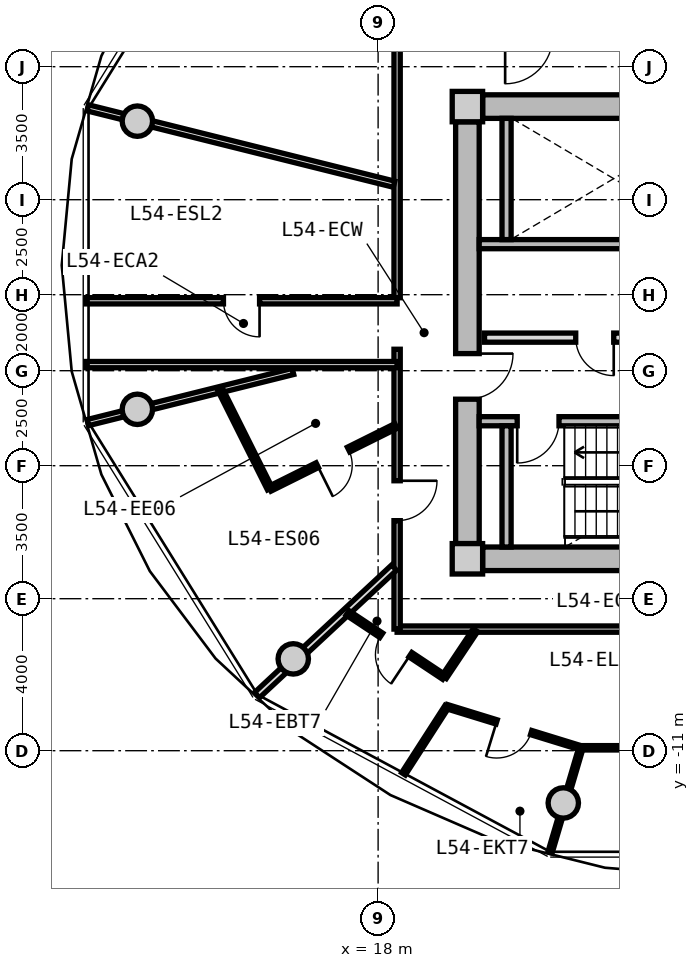
"""IFC4 building model, lengths in metres.
Left out: names, types, materials, properties, quantities, classifications, styles, units other than length and angle.
Written with IfcOpenShell. Run it as: python <this file> out.ifc"""

import sys

from ifc_helpers import new_model, si_unit, direction, frame, frame_2d, origin, origin_2d, place, context, subcontext, project, spatial, rectangle, circle, extrude, source, transform, mapped, element, fill, save


model = new_model("IFC4")
c1 = context("Model", 3, precision=1e-05, world=origin(), true_north=direction((0.0, 1.0)))
c2 = subcontext(c1, "Body", "Model", "MODEL_VIEW")
j1 = project(units=[si_unit("LENGTHUNIT", "METRE"), si_unit("PLANEANGLEUNIT", "RADIAN")], contexts=[c1])
p1 = place(None, origin())
s1 = spatial("IfcSite", under=j1, at=p1, CompositionType="ELEMENT")
p2 = place(p1, origin())
s2 = spatial("IfcBuilding", under=s1, at=p2, CompositionType="ELEMENT")
p3 = place(p2, frame((0.0, 0.0, 173.95)))
s3 = spatial("IfcBuildingStorey", under=s2, at=p3, CompositionType="ELEMENT", Elevation=173.95)
m1 = source(origin(), c2, "Body", "SweptSolid", [
    extrude(rectangle(XDim=0.8, YDim=0.8, at=origin_2d()), origin(), (0.0, 0.0, 1.0), 3.05),
])
for number, where, z_axis, x_axis in (
    (1, (20.35, -5.95, 0.0), (0.0, 0.0, 1.0), (1.0, 0.0, 0.0)),
    (2, (20.35, 5.95, 0.0), (0.0, 0.0, 1.0), (1.0, 0.0, 0.0)),
):
    element("IfcColumn", number, at=place(p3, frame(where, z_axis=z_axis, x_axis=x_axis)), inside=s3, PredefinedType="COLUMN", context=c2, shape_type="MappedRepresentation", body=[
        mapped(m1, transform((0.0, 0.0, 0.0), x_axis=(1.0, 0.0, 0.0), y_axis=(0.0, 1.0, 0.0), z_axis=(0.0, 0.0, 1.0), scale=1.0)),
    ])
m2 = source(origin(), c2, "Body", "SweptSolid", [
    extrude(rectangle(XDim=14.5, YDim=0.62, at=frame_2d((7.25, 0.0))), origin(), (0.0, 0.0, 1.0), 2.81),
])
for number, where, z_axis, x_axis in (
    (3, (20.75, 5.95, 0.0), (0.0, 0.0, 1.0), (1.0, 0.0, 0.0)),
    (4, (35.25, -5.95, 0.0), (0.0, 0.0, 1.0), (-1.0, 0.0, 0.0)),
):
    element("IfcWall", number, at=place(p3, frame(where, z_axis=z_axis, x_axis=x_axis)), inside=s3, PredefinedType="SHEAR", context=c2, shape_type="MappedRepresentation", body=[
        mapped(m2, transform((0.0, 0.0, 0.0), x_axis=(1.0, 0.0, 0.0), y_axis=(0.0, 1.0, 0.0), z_axis=(0.0, 0.0, 1.0), scale=1.0)),
    ])
m3 = source(origin(), c2, "Body", "SweptSolid", [
    extrude(rectangle(XDim=11.1, YDim=0.62, at=frame_2d((5.55, 0.0))), origin(), (0.0, 0.0, 1.0), 2.81),
])
p4 = place(p3, frame((20.35, -5.55, 0.0), z_axis=(0.0, 0.0, 1.0), x_axis=(0.0, 1.0, 0.0)))
e5 = element("IfcWall", 5, at=p4, inside=s3, PredefinedType="SHEAR", context=c2, shape_type="MappedRepresentation", body=[
    mapped(m3, transform((0.0, 0.0, 0.0), x_axis=(1.0, 0.0, 0.0), y_axis=(0.0, 1.0, 0.0), z_axis=(0.0, 0.0, 1.0), scale=1.0)),
])
p5 = place(p4, frame((3.8, 0.0, 0.0)))
e6 = element("IfcOpeningElement", 6, at=p5, cuts=e5, PredefinedType="OPENING", context=c2, shape_type="SweptSolid", body=[
    extrude(rectangle(XDim=1.2, YDim=2.15, at=frame_2d((0.6, 1.075))), frame((0.0, 0.32, 0.0), z_axis=(0.0, -1.0, 0.0), x_axis=(1.0, 0.0, 0.0)), (0.0, 0.0, 1.0), 0.64),
])
m4 = source(origin(), c2, "Body", "SweptSolid", [
    extrude(circle(Radius=0.4, at=origin_2d()), origin(), (0.0, 0.0, 1.0), 3.05),
])
for number, where, z_axis, x_axis in (
    (7, (11.665, 5.567, 0.0), (0.0, 0.0, 1.0), (1.0, 0.0, 0.0)),
    (8, (11.665, -2.016, 0.0), (0.0, 0.0, 1.0), (1.0, 0.0, 0.0)),
    (9, (15.767, -8.584, 0.0), (0.0, 0.0, 1.0), (1.0, 0.0, 0.0)),
    (10, (22.873, -12.375, 0.0), (0.0, 0.0, 1.0), (1.0, 0.0, 0.0)),
):
    element("IfcColumn", number, at=place(p3, frame(where, z_axis=z_axis, x_axis=x_axis)), inside=s3, PredefinedType="COLUMN", context=c2, shape_type="MappedRepresentation", body=[
        mapped(m4, transform((0.0, 0.0, 0.0), x_axis=(1.0, 0.0, 0.0), y_axis=(0.0, 1.0, 0.0), z_axis=(0.0, 0.0, 1.0), scale=1.0)),
    ])
m5 = source(origin(), c2, "Body", "SweptSolid", [
    extrude(rectangle(XDim=7.88, YDim=0.24, at=frame_2d((3.94, 0.0))), origin(), (0.0, 0.0, 1.0), 2.81),
])
p6 = place(p3, frame((20.66, 2.33, 0.0), z_axis=(0.0, 0.0, 1.0), x_axis=(1.0, 0.0, 0.0)))
e11 = element("IfcWall", 11, at=p6, inside=s3, PredefinedType="PARTITIONING", context=c2, shape_type="MappedRepresentation", body=[
    mapped(m5, transform((0.0, 0.0, 0.0), x_axis=(1.0, 0.0, 0.0), y_axis=(0.0, 1.0, 0.0), z_axis=(0.0, 0.0, 1.0), scale=1.0)),
])
m6 = source(origin(), c2, "Body", "SweptSolid", [
    extrude(rectangle(XDim=3.19, YDim=0.24, at=frame_2d((1.595, 0.0))), origin(), (0.0, 0.0, 1.0), 2.81),
])
p7 = place(p3, frame((21.38, 2.45, 0.0), z_axis=(0.0, 0.0, 1.0), x_axis=(0.0, 1.0, 0.0)))
e12 = element("IfcWall", 12, at=p7, inside=s3, PredefinedType="PARTITIONING", context=c2, shape_type="MappedRepresentation", body=[
    mapped(m6, transform((0.0, 0.0, 0.0), x_axis=(1.0, 0.0, 0.0), y_axis=(0.0, 1.0, 0.0), z_axis=(0.0, 0.0, 1.0), scale=1.0)),
])
p8 = place(p3, frame((20.66, -2.33, 0.0), z_axis=(0.0, 0.0, 1.0), x_axis=(1.0, 0.0, 0.0)))
e13 = element("IfcWall", 13, at=p8, inside=s3, PredefinedType="PARTITIONING", context=c2, shape_type="MappedRepresentation", body=[
    mapped(m5, transform((0.0, 0.0, 0.0), x_axis=(1.0, 0.0, 0.0), y_axis=(0.0, 1.0, 0.0), z_axis=(0.0, 0.0, 1.0), scale=1.0)),
])
p9 = place(p8, frame((1.0, 0.0, 0.0)))
e14 = element("IfcOpeningElement", 14, at=p9, cuts=e13, PredefinedType="OPENING", context=c2, shape_type="SweptSolid", body=[
    extrude(rectangle(XDim=1.1, YDim=2.15, at=frame_2d((0.55, 1.075))), frame((0.0, 0.13, 0.0), z_axis=(0.0, -1.0, 0.0), x_axis=(1.0, 0.0, 0.0)), (0.0, 0.0, 1.0), 0.26),
])
p10 = place(p3, frame((21.38, -5.64, 0.0), z_axis=(0.0, 0.0, 1.0), x_axis=(0.0, 1.0, 0.0)))
e15 = element("IfcWall", 15, at=p10, inside=s3, PredefinedType="PARTITIONING", context=c2, shape_type="MappedRepresentation", body=[
    mapped(m6, transform((0.0, 0.0, 0.0), x_axis=(1.0, 0.0, 0.0), y_axis=(0.0, 1.0, 0.0), z_axis=(0.0, 0.0, 1.0), scale=1.0)),
])
m7 = source(origin(), c2, "Body", "SweptSolid", [
    extrude(rectangle(XDim=7.62, YDim=0.24, at=frame_2d((3.81, 0.0))), origin(), (0.0, 0.0, 1.0), 2.795),
])
p11 = place(p3, frame((20.8, -0.13, 0.0), z_axis=(0.0, 0.0, 1.0), x_axis=(1.0, 0.0, 0.0)))
e16 = element("IfcWall", 16, at=p11, inside=s3, PredefinedType="PARTITIONING", context=c2, shape_type="MappedRepresentation", body=[
    mapped(m7, transform((0.0, 0.0, 0.0), x_axis=(1.0, 0.0, 0.0), y_axis=(0.0, 1.0, 0.0), z_axis=(0.0, 0.0, 1.0), scale=1.0)),
])
p12 = place(p11, frame((6.22, 0.0, 0.0)))
e17 = element("IfcOpeningElement", 17, at=p12, cuts=e16, PredefinedType="OPENING", context=c2, shape_type="SweptSolid", body=[
    extrude(rectangle(XDim=1.0, YDim=2.1, at=frame_2d((0.5, 1.05))), frame((0.0, 0.13, 0.0), z_axis=(0.0, -1.0, 0.0), x_axis=(1.0, 0.0, 0.0)), (0.0, 0.0, 1.0), 0.26),
])
p13 = place(p11, frame((2.4, 0.0, 0.0)))
e18 = element("IfcOpeningElement", 18, at=p13, cuts=e16, PredefinedType="OPENING", context=c2, shape_type="SweptSolid", body=[
    extrude(rectangle(XDim=1.0, YDim=2.1, at=frame_2d((0.5, 1.05))), frame((0.0, 0.13, 0.0), z_axis=(0.0, -1.0, 0.0), x_axis=(1.0, 0.0, 0.0)), (0.0, 0.0, 1.0), 0.26),
])
m8 = source(origin(), c2, "Body", "SweptSolid", [
    extrude(rectangle(XDim=19.0, YDim=0.165, at=frame_2d((9.5, 0.0))), origin(), (0.0, 0.0, 1.0), 2.795),
])
p14 = place(p3, frame((37.5, -7.8, 0.0), z_axis=(0.0, 0.0, 1.0), x_axis=(-1.0, 0.0, 0.0)))
e19 = element("IfcWall", 19, at=p14, inside=s3, PredefinedType="PARTITIONING", context=c2, shape_type="MappedRepresentation", body=[
    mapped(m8, transform((0.0, 0.0, 0.0), x_axis=(1.0, 0.0, 0.0), y_axis=(0.0, 1.0, 0.0), z_axis=(0.0, 0.0, 1.0), scale=1.0)),
])
p15 = place(p14, frame((8.061, 0.0, 0.0)))
e20 = element("IfcOpeningElement", 20, at=p15, cuts=e19, PredefinedType="OPENING", context=c2, shape_type="SweptSolid", body=[
    extrude(rectangle(XDim=1.05, YDim=2.15, at=frame_2d((0.525, 1.075))), frame((0.0, 0.093, 0.0), z_axis=(0.0, -1.0, 0.0), x_axis=(1.0, 0.0, 0.0)), (0.0, 0.0, 1.0), 0.185),
])
m9 = source(origin(), c2, "Body", "SweptSolid", [
    extrude(rectangle(XDim=7.365, YDim=0.165, at=frame_2d((3.682, 0.0))), origin(), (0.0, 0.0, 1.0), 2.795),
])
p16 = place(p3, frame((18.5, -7.8, 0.0), z_axis=(0.0, 0.0, 1.0), x_axis=(0.0, 1.0, 0.0)))
e21 = element("IfcWall", 21, at=p16, inside=s3, PredefinedType="PARTITIONING", context=c2, shape_type="MappedRepresentation", body=[
    mapped(m9, transform((0.0, 0.0, 0.0), x_axis=(1.0, 0.0, 0.0), y_axis=(0.0, 1.0, 0.0), z_axis=(0.0, 0.0, 1.0), scale=1.0)),
])
p17 = place(p16, frame((2.854, 0.0, 0.0)))
e22 = element("IfcOpeningElement", 22, at=p17, cuts=e21, PredefinedType="OPENING", context=c2, shape_type="SweptSolid", body=[
    extrude(rectangle(XDim=1.05, YDim=2.15, at=frame_2d((0.525, 1.075))), frame((0.0, 0.093, 0.0), z_axis=(0.0, -1.0, 0.0), x_axis=(1.0, 0.0, 0.0)), (0.0, 0.0, 1.0), 0.185),
])
m10 = source(origin(), c2, "Body", "SweptSolid", [
    extrude(rectangle(XDim=6.88, YDim=0.165, at=frame_2d((3.44, 0.0))), origin(), (0.0, 0.0, 1.0), 2.795),
])
p18 = place(p3, frame((18.5, 0.92, 0.0), z_axis=(0.0, 0.0, 1.0), x_axis=(0.0, 1.0, 0.0)))
e23 = element("IfcWall", 23, at=p18, inside=s3, PredefinedType="PARTITIONING", context=c2, shape_type="MappedRepresentation", body=[
    mapped(m10, transform((0.0, 0.0, 0.0), x_axis=(1.0, 0.0, 0.0), y_axis=(0.0, 1.0, 0.0), z_axis=(0.0, 0.0, 1.0), scale=1.0)),
])
m11 = source(origin(), c2, "Body", "SweptSolid", [
    extrude(rectangle(XDim=8.305, YDim=0.165, at=frame_2d((4.153, 0.0))), origin(), (0.0, 0.0, 1.0), 2.345),
])
p19 = place(p3, frame((18.42, 3.908, 0.0), z_axis=(0.0, 0.0, 1.0), x_axis=(-0.970309994378, 0.241864662175, 0.0)))
e24 = element("IfcWall", 24, at=p19, inside=s3, PredefinedType="PARTITIONING", context=c2, shape_type="MappedRepresentation", body=[
    mapped(m11, transform((0.0, 0.0, 0.0), x_axis=(1.0, 0.0, 0.0), y_axis=(0.0, 1.0, 0.0), z_axis=(0.0, 0.0, 1.0), scale=1.0)),
])
m12 = source(origin(), c2, "Body", "SweptSolid", [
    extrude(rectangle(XDim=5.564, YDim=0.165, at=frame_2d((2.782, 0.0))), origin(), (0.0, 0.0, 1.0), 2.345),
])
p20 = place(p3, frame((15.76, -1.02, 0.0), z_axis=(0.0, 0.0, 1.0), x_axis=(-0.970315176167, -0.241843872984, 0.0)))
e25 = element("IfcWall", 25, at=p20, inside=s3, PredefinedType="PARTITIONING", context=c2, shape_type="MappedRepresentation", body=[
    mapped(m12, transform((0.0, 0.0, 0.0), x_axis=(1.0, 0.0, 0.0), y_axis=(0.0, 1.0, 0.0), z_axis=(0.0, 0.0, 1.0), scale=1.0)),
])
m13 = source(origin(), c2, "Body", "SweptSolid", [
    extrude(rectangle(XDim=8.189, YDim=0.165, at=frame_2d((4.094, 0.0))), origin(), (0.0, 0.0, 1.0), 2.795),
])
p21 = place(p3, frame((10.311, 0.84, 0.0), z_axis=(0.0, 0.0, 1.0), x_axis=(1.0, 0.0, 0.0)))
e26 = element("IfcWall", 26, at=p21, inside=s3, PredefinedType="PARTITIONING", context=c2, shape_type="MappedRepresentation", body=[
    mapped(m13, transform((0.0, 0.0, 0.0), x_axis=(1.0, 0.0, 0.0), y_axis=(0.0, 1.0, 0.0), z_axis=(0.0, 0.0, 1.0), scale=1.0)),
])
p22 = place(p21, frame((3.619, 0.0, 0.0)))
e27 = element("IfcOpeningElement", 27, at=p22, cuts=e26, PredefinedType="OPENING", context=c2, shape_type="SweptSolid", body=[
    extrude(rectangle(XDim=0.95, YDim=2.1, at=frame_2d((0.475, 1.05))), frame((0.0, 0.093, 0.0), z_axis=(0.0, -1.0, 0.0), x_axis=(1.0, 0.0, 0.0)), (0.0, 0.0, 1.0), 0.185),
])
p23 = place(p3, frame((18.5, -0.84, 0.0), z_axis=(0.0, 0.0, 1.0), x_axis=(-1.0, 0.0, 0.0)))
e28 = element("IfcWall", 28, at=p23, inside=s3, PredefinedType="PARTITIONING", context=c2, shape_type="MappedRepresentation", body=[
    mapped(m13, transform((0.0, 0.0, 0.0), x_axis=(1.0, 0.0, 0.0), y_axis=(0.0, 1.0, 0.0), z_axis=(0.0, 0.0, 1.0), scale=1.0)),
])
m14 = source(origin(), c2, "Body", "SweptSolid", [
    extrude(rectangle(XDim=4.927, YDim=0.19, at=frame_2d((2.463, 0.0))), origin(), (0.0, 0.0, 1.0), 2.345),
])
p24 = place(p3, frame((18.42, -6.183, 0.0), z_axis=(0.0, 0.0, 1.0), x_axis=(-0.732191335987, -0.681098999783, 0.0)))
e29 = element("IfcWall", 29, at=p24, inside=s3, PredefinedType="PARTITIONING", context=c2, shape_type="MappedRepresentation", body=[
    mapped(m14, transform((0.0, 0.0, 0.0), x_axis=(1.0, 0.0, 0.0), y_axis=(0.0, 1.0, 0.0), z_axis=(0.0, 0.0, 1.0), scale=1.0)),
])
m15 = source(origin(), c2, "Body", "SweptSolid", [
    extrude(rectangle(XDim=3.707, YDim=0.14, at=frame_2d((1.854, 0.0))), origin(), (0.0, 0.0, 1.0), 2.795),
])
p25 = place(p3, frame((18.47, -2.456, 0.0), z_axis=(0.0, 0.0, 1.0), x_axis=(-0.895347377717, -0.44536846904, 0.0)))
e30 = element("IfcWall", 30, at=p25, inside=s3, PredefinedType="PARTITIONING", context=c2, shape_type="MappedRepresentation", body=[
    mapped(m15, transform((0.0, 0.0, 0.0), x_axis=(1.0, 0.0, 0.0), y_axis=(0.0, 1.0, 0.0), z_axis=(0.0, 0.0, 1.0), scale=1.0)),
])
p26 = place(p25, frame((1.394, 0.0, 0.0)))
e31 = element("IfcOpeningElement", 31, at=p26, cuts=e30, PredefinedType="OPENING", context=c2, shape_type="SweptSolid", body=[
    extrude(rectangle(XDim=0.92, YDim=2.1, at=frame_2d((0.46, 1.05))), frame((0.0, 0.08, 0.0), z_axis=(0.0, -1.0, 0.0), x_axis=(1.0, 0.0, 0.0)), (0.0, 0.0, 1.0), 0.16),
])
m16 = source(origin(), c2, "Body", "SweptSolid", [
    extrude(rectangle(XDim=2.918, YDim=0.14, at=frame_2d((1.459, 0.0))), origin(), (0.0, 0.0, 1.0), 2.795),
])
p27 = place(p3, frame((15.151, -4.107, 0.0), z_axis=(0.0, 0.0, 1.0), x_axis=(-0.447146668647, 0.894460651296, 0.0)))
e32 = element("IfcWall", 32, at=p27, inside=s3, PredefinedType="PARTITIONING", context=c2, shape_type="MappedRepresentation", body=[
    mapped(m16, transform((0.0, 0.0, 0.0), x_axis=(1.0, 0.0, 0.0), y_axis=(0.0, 1.0, 0.0), z_axis=(0.0, 0.0, 1.0), scale=1.0)),
])
m17 = source(origin(), c2, "Body", "SweptSolid", [
    extrude(rectangle(XDim=7.274, YDim=0.115, at=frame_2d((3.637, 0.0))), origin(), (0.0, 0.0, 1.0), 2.795),
])
p28 = place(p3, frame((23.338, -10.924, 0.0), z_axis=(0.0, 0.0, 1.0), x_axis=(1.0, 0.0, 0.0)))
e33 = element("IfcWall", 33, at=p28, inside=s3, PredefinedType="PARTITIONING", context=c2, shape_type="MappedRepresentation", body=[
    mapped(m17, transform((0.0, 0.0, 0.0), x_axis=(1.0, 0.0, 0.0), y_axis=(0.0, 1.0, 0.0), z_axis=(0.0, 0.0, 1.0), scale=1.0)),
])
p29 = place(p28, frame((3.162, 0.0, 0.0)))
e34 = element("IfcOpeningElement", 34, at=p29, cuts=e33, PredefinedType="OPENING", context=c2, shape_type="SweptSolid", body=[
    extrude(rectangle(XDim=0.95, YDim=2.1, at=frame_2d((0.475, 1.05))), frame((0.0, 0.067, 0.0), z_axis=(0.0, -1.0, 0.0), x_axis=(1.0, 0.0, 0.0)), (0.0, 0.0, 1.0), 0.135),
])
m18 = source(origin(), c2, "Body", "SweptSolid", [
    extrude(rectangle(XDim=2.874, YDim=0.115, at=frame_2d((1.437, 0.0))), origin(), (0.0, 0.0, 1.0), 2.345),
])
p30 = place(p3, frame((23.338, -10.924, 0.0), z_axis=(0.0, 0.0, 1.0), x_axis=(-0.283573427988, -0.958950525804, 0.0)))
e35 = element("IfcWall", 35, at=p30, inside=s3, PredefinedType="PARTITIONING", context=c2, shape_type="MappedRepresentation", body=[
    mapped(m18, transform((0.0, 0.0, 0.0), x_axis=(1.0, 0.0, 0.0), y_axis=(0.0, 1.0, 0.0), z_axis=(0.0, 0.0, 1.0), scale=1.0)),
])
m19 = source(origin(), c2, "Body", "SweptSolid", [
    extrude(rectangle(XDim=1.482, YDim=0.14, at=frame_2d((0.741, 0.0))), origin(), (0.0, 0.0, 1.0), 2.795),
])
p31 = place(p3, frame((20.56, -7.83, 0.0), z_axis=(0.0, 0.0, 1.0), x_axis=(-0.555308105158, -0.831644700786, 0.0)))
e36 = element("IfcWall", 36, at=p31, inside=s3, PredefinedType="PARTITIONING", context=c2, shape_type="MappedRepresentation", body=[
    mapped(m19, transform((0.0, 0.0, 0.0), x_axis=(1.0, 0.0, 0.0), y_axis=(0.0, 1.0, 0.0), z_axis=(0.0, 0.0, 1.0), scale=1.0)),
])
m20 = source(origin(), c2, "Body", "SweptSolid", [
    extrude(rectangle(XDim=3.051, YDim=0.14, at=frame_2d((1.525, 0.0))), origin(), (0.0, 0.0, 1.0), 2.795),
])
p32 = place(p3, frame((19.737, -9.063, 0.0), z_axis=(0.0, 0.0, 1.0), x_axis=(-0.832763694299, 0.553628602456, 0.0)))
e37 = element("IfcWall", 37, at=p32, inside=s3, PredefinedType="PARTITIONING", context=c2, shape_type="MappedRepresentation", body=[
    mapped(m20, transform((0.0, 0.0, 0.0), x_axis=(1.0, 0.0, 0.0), y_axis=(0.0, 1.0, 0.0), z_axis=(0.0, 0.0, 1.0), scale=1.0)),
])
p33 = place(p32, frame((1.065, 0.0, 0.0)))
e38 = element("IfcOpeningElement", 38, at=p33, cuts=e37, PredefinedType="OPENING", context=c2, shape_type="SweptSolid", body=[
    extrude(rectangle(XDim=0.92, YDim=2.1, at=frame_2d((0.46, 1.05))), frame((0.0, 0.08, 0.0), z_axis=(0.0, -1.0, 0.0), x_axis=(1.0, 0.0, 0.0)), (0.0, 0.0, 1.0), 0.16),
])
m21 = source(origin(), c2, "Body", "SweptSolid", [
    extrude(rectangle(XDim=2.105, YDim=0.115, at=frame_2d((1.052, 0.0))), origin(), (0.0, 0.0, 1.0), 2.795),
])
p34 = place(p3, frame((19.808, -9.839, 0.0), z_axis=(0.0, 0.0, 1.0), x_axis=(-0.541542884204, -0.840673125875, 0.0)))
e39 = element("IfcWall", 39, at=p34, inside=s3, PredefinedType="PARTITIONING", context=c2, shape_type="MappedRepresentation", body=[
    mapped(m21, transform((0.0, 0.0, 0.0), x_axis=(1.0, 0.0, 0.0), y_axis=(0.0, 1.0, 0.0), z_axis=(0.0, 0.0, 1.0), scale=1.0)),
])
m22 = source(origin(), c2, "Body", "SweptSolid", [
    extrude(rectangle(XDim=3.693, YDim=0.115, at=frame_2d((1.847, 0.0))), origin(), (0.0, 0.0, 1.0), 2.795),
])
p35 = place(p3, frame((19.808, -9.839, 0.0), z_axis=(0.0, 0.0, 1.0), x_axis=(0.955691778506, -0.294369197599, 0.0)))
e40 = element("IfcWall", 40, at=p35, inside=s3, PredefinedType="PARTITIONING", context=c2, shape_type="MappedRepresentation", body=[
    mapped(m22, transform((0.0, 0.0, 0.0), x_axis=(1.0, 0.0, 0.0), y_axis=(0.0, 1.0, 0.0), z_axis=(0.0, 0.0, 1.0), scale=1.0)),
])
p36 = place(p35, frame((1.372, 0.0, 0.0)))
e41 = element("IfcOpeningElement", 41, at=p36, cuts=e40, PredefinedType="OPENING", context=c2, shape_type="SweptSolid", body=[
    extrude(rectangle(XDim=0.95, YDim=2.1, at=frame_2d((0.475, 1.05))), frame((0.0, 0.067, 0.0), z_axis=(0.0, -1.0, 0.0), x_axis=(1.0, 0.0, 0.0)), (0.0, 0.0, 1.0), 0.135),
])
m23 = source(origin(), c2, "Body", "SweptSolid", [
    extrude(rectangle(XDim=1.1, YDim=2.15, at=frame_2d((0.55, 1.075))), frame((0.0, 0.025, 0.0), z_axis=(0.0, -1.0, 0.0), x_axis=(1.0, 0.0, 0.0)), (0.0, 0.0, 1.0), 0.05),
])
p37 = place(p9, frame((1.1, 0.0, 0.0), z_axis=(0.0, 0.0, 1.0), x_axis=(-1.0, 0.0, 0.0)))
e42 = element("IfcDoor", 42, at=p37, inside=s3, OperationType="SINGLE_SWING_RIGHT", PredefinedType="DOOR", context=c2, shape_type="MappedRepresentation", body=[
    mapped(m23, transform((0.0, 0.0, 0.0), x_axis=(1.0, 0.0, 0.0), y_axis=(0.0, 1.0, 0.0), z_axis=(0.0, 0.0, 1.0), scale=1.0)),
])
fill(e14, e42)
m24 = source(origin(), c2, "Body", "SweptSolid", [
    extrude(rectangle(XDim=1.2, YDim=2.15, at=frame_2d((0.6, 1.075))), frame((0.0, 0.025, 0.0), z_axis=(0.0, -1.0, 0.0), x_axis=(1.0, 0.0, 0.0)), (0.0, 0.0, 1.0), 0.05),
])
p38 = place(p5, frame((1.2, 0.0, 0.0), z_axis=(0.0, 0.0, 1.0), x_axis=(-1.0, 0.0, 0.0)))
e43 = element("IfcDoor", 43, at=p38, inside=s3, OperationType="SINGLE_SWING_LEFT", PredefinedType="DOOR", context=c2, shape_type="MappedRepresentation", body=[
    mapped(m24, transform((0.0, 0.0, 0.0), x_axis=(1.0, 0.0, 0.0), y_axis=(0.0, 1.0, 0.0), z_axis=(0.0, 0.0, 1.0), scale=1.0)),
])
fill(e6, e43)
m25 = source(origin(), c2, "Body", "SweptSolid", [
    extrude(rectangle(XDim=1.0, YDim=2.1, at=frame_2d((0.5, 1.05))), frame((0.0, 0.025, 0.0), z_axis=(0.0, -1.0, 0.0), x_axis=(1.0, 0.0, 0.0)), (0.0, 0.0, 1.0), 0.05),
])
p39 = place(p13, frame((1.0, 0.0, 0.0), z_axis=(0.0, 0.0, 1.0), x_axis=(-1.0, 0.0, 0.0)))
e44 = element("IfcDoor", 44, at=p39, inside=s3, OperationType="SINGLE_SWING_LEFT", PredefinedType="DOOR", context=c2, shape_type="MappedRepresentation", body=[
    mapped(m25, transform((0.0, 0.0, 0.0), x_axis=(1.0, 0.0, 0.0), y_axis=(0.0, 1.0, 0.0), z_axis=(0.0, 0.0, 1.0), scale=1.0)),
])
fill(e18, e44)
m26 = source(origin(), c2, "Body", "SweptSolid", [
    extrude(rectangle(XDim=0.95, YDim=2.1, at=frame_2d((0.475, 1.05))), frame((0.0, 0.025, 0.0), z_axis=(0.0, -1.0, 0.0), x_axis=(1.0, 0.0, 0.0)), (0.0, 0.0, 1.0), 0.05),
])
p40 = place(p22, frame((0.95, 0.0, 0.0), z_axis=(0.0, 0.0, 1.0), x_axis=(-1.0, 0.0, 0.0)))
e45 = element("IfcDoor", 45, at=p40, inside=s3, OperationType="SINGLE_SWING_LEFT", PredefinedType="DOOR", context=c2, shape_type="MappedRepresentation", body=[
    mapped(m26, transform((0.0, 0.0, 0.0), x_axis=(1.0, 0.0, 0.0), y_axis=(0.0, 1.0, 0.0), z_axis=(0.0, 0.0, 1.0), scale=1.0)),
])
fill(e27, e45)
m27 = source(origin(), c2, "Body", "SweptSolid", [
    extrude(rectangle(XDim=1.05, YDim=2.15, at=frame_2d((0.525, 1.075))), frame((0.0, 0.025, 0.0), z_axis=(0.0, -1.0, 0.0), x_axis=(1.0, 0.0, 0.0)), (0.0, 0.0, 1.0), 0.05),
])
p41 = place(p17, frame((1.05, 0.0, 0.0), z_axis=(0.0, 0.0, 1.0), x_axis=(-1.0, 0.0, 0.0)))
e46 = element("IfcDoor", 46, at=p41, inside=s3, OperationType="SINGLE_SWING_LEFT", PredefinedType="DOOR", context=c2, shape_type="MappedRepresentation", body=[
    mapped(m27, transform((0.0, 0.0, 0.0), x_axis=(1.0, 0.0, 0.0), y_axis=(0.0, 1.0, 0.0), z_axis=(0.0, 0.0, 1.0), scale=1.0)),
])
fill(e22, e46)
m28 = source(origin(), c2, "Body", "SweptSolid", [
    extrude(rectangle(XDim=0.92, YDim=2.1, at=frame_2d((0.46, 1.05))), frame((0.0, 0.025, 0.0), z_axis=(0.0, -1.0, 0.0), x_axis=(1.0, 0.0, 0.0)), (0.0, 0.0, 1.0), 0.05),
])
p42 = place(p26, origin())
e47 = element("IfcDoor", 47, at=p42, inside=s3, OperationType="SINGLE_SWING_RIGHT", PredefinedType="DOOR", context=c2, shape_type="MappedRepresentation", body=[
    mapped(m28, transform((0.0, 0.0, 0.0), x_axis=(1.0, 0.0, 0.0), y_axis=(0.0, 1.0, 0.0), z_axis=(0.0, 0.0, 1.0), scale=1.0)),
])
fill(e31, e47)
p43 = place(p33, origin())
e48 = element("IfcDoor", 48, at=p43, inside=s3, OperationType="SINGLE_SWING_LEFT", PredefinedType="DOOR", context=c2, shape_type="MappedRepresentation", body=[
    mapped(m28, transform((0.0, 0.0, 0.0), x_axis=(1.0, 0.0, 0.0), y_axis=(0.0, 1.0, 0.0), z_axis=(0.0, 0.0, 1.0), scale=1.0)),
])
fill(e38, e48)
p44 = place(p36, frame((0.95, 0.0, 0.0), z_axis=(0.0, 0.0, 1.0), x_axis=(-1.0, 0.0, 0.0)))
e49 = element("IfcDoor", 49, at=p44, inside=s3, OperationType="SINGLE_SWING_RIGHT", PredefinedType="DOOR", context=c2, shape_type="MappedRepresentation", body=[
    mapped(m26, transform((0.0, 0.0, 0.0), x_axis=(1.0, 0.0, 0.0), y_axis=(0.0, 1.0, 0.0), z_axis=(0.0, 0.0, 1.0), scale=1.0)),
])
fill(e41, e49)
save(model, sys.argv[1])
